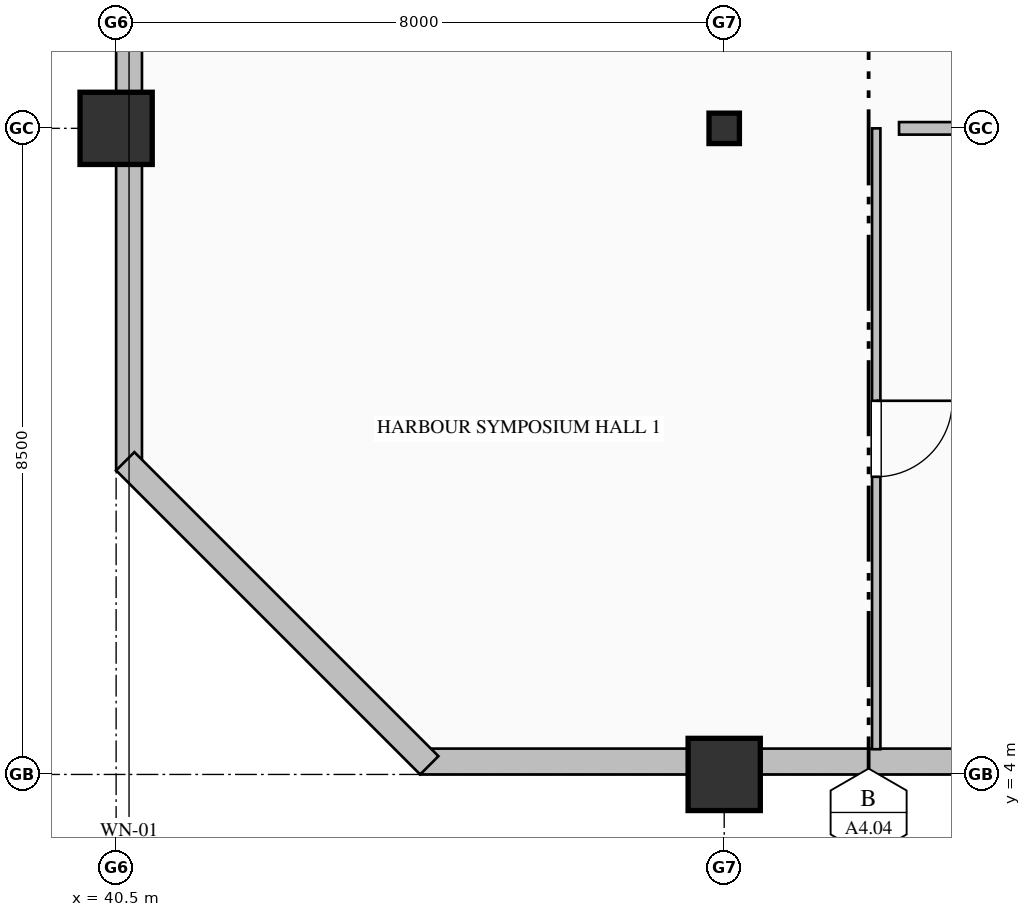
"""IFC4 building model, lengths in metres.
Left out: names, types, materials, properties, quantities, classifications, styles, units other than length and angle.
Written with IfcOpenShell. Run it as: python <this file> out.ifc"""

import sys

from ifc_helpers import new_model, si_unit, direction, frame, frame_2d, origin, origin_2d, place, context, subcontext, project, spatial, rectangle, hollow_rectangle, i_section, extrude, element, fill, save


model = new_model("IFC4")
c1 = context("Model", 3, precision=1e-05, world=origin(), true_north=direction((0.0, 1.0)))
c2 = subcontext(c1, "Body", "Model", "MODEL_VIEW")
j1 = project(units=[si_unit("LENGTHUNIT", "METRE"), si_unit("PLANEANGLEUNIT", "RADIAN")], contexts=[c1])
p1 = place(None, origin())
s1 = spatial("IfcSite", under=j1, at=p1, CompositionType="ELEMENT")
p2 = place(p1, origin())
s2 = spatial("IfcBuilding", under=s1, at=p2, CompositionType="ELEMENT")
p3 = place(p2, frame((0.0, 0.0, 147.0)))
s3 = spatial("IfcBuildingStorey", under=s2, at=p3, CompositionType="ELEMENT", Elevation=147.0)
for number, where, z_axis, x_axis in (
    (1, (40.5, 12.5, 0.0), (0.0, 0.0, 1.0), (1.0, 0.0, 0.0)),
    (2, (48.5, 4.0, 0.0), (0.0, 0.0, 1.0), (1.0, 0.0, 0.0)),
):
    element("IfcColumn", number, at=place(p3, frame(where, z_axis=z_axis, x_axis=x_axis)), inside=s3, PredefinedType="COLUMN", context=c2, shape_type="SweptSolid", body=[
        extrude(hollow_rectangle(XDim=0.95, YDim=0.95, WallThickness=0.036, at=origin_2d()), origin(), (0.0, 0.0, 1.0), 4.0),
    ])
p4 = place(p3, frame((48.5, 12.5, 0.0), z_axis=(0.0, 0.0, 1.0), x_axis=(1.0, 0.0, 0.0)))
e3 = element("IfcColumn", 3, at=p4, inside=s3, PredefinedType="COLUMN", context=c2, shape_type="SweptSolid", body=[
    extrude(i_section(OverallWidth=0.4, OverallDepth=0.4, WebThickness=0.013, FlangeThickness=0.021, FilletRadius=0.022, at=origin_2d()), origin(), (0.0, 0.0, 1.0), 4.0),
])
p5 = place(p3, frame((40.67, 8.0, 0.0), z_axis=(0.0, 0.0, 1.0), x_axis=(0.0, 1.0, 0.0)))
e4 = element("IfcWall", 4, at=p5, inside=s3, PredefinedType="SOLIDWALL", context=c2, shape_type="SweptSolid", body=[
    extrude(rectangle(XDim=20.34, YDim=0.34, at=frame_2d((10.17, 0.0))), origin(), (0.0, 0.0, 1.0), 3.165),
])
p6 = place(p5, frame((13.8, 0.0, 0.7)))
e5 = element("IfcOpeningElement", 5, at=p6, cuts=e4, PredefinedType="OPENING", context=c2, shape_type="SweptSolid", body=[
    extrude(rectangle(XDim=1.2, YDim=1.85, at=frame_2d((0.6, 0.925))), frame((0.0, 0.18, 0.0), z_axis=(0.0, -1.0, 0.0), x_axis=(1.0, 0.0, 0.0)), (0.0, 0.0, 1.0), 0.36),
])
p7 = place(p3, frame((60.0, 4.17, 0.0), z_axis=(0.0, 0.0, 1.0), x_axis=(-1.0, 0.0, 0.0)))
e6 = element("IfcWall", 6, at=p7, inside=s3, PredefinedType="SOLIDWALL", context=c2, shape_type="SweptSolid", body=[
    extrude(rectangle(XDim=15.5, YDim=0.34, at=frame_2d((7.75, 0.0))), origin(), (0.0, 0.0, 1.0), 3.265),
])
p8 = place(p7, frame((6.6, 0.0, 0.7)))
e7 = element("IfcOpeningElement", 7, at=p8, cuts=e6, PredefinedType="OPENING", context=c2, shape_type="SweptSolid", body=[
    extrude(rectangle(XDim=1.2, YDim=1.85, at=frame_2d((0.6, 0.925))), frame((0.0, 0.18, 0.0), z_axis=(0.0, -1.0, 0.0), x_axis=(1.0, 0.0, 0.0)), (0.0, 0.0, 1.0), 0.36),
])
p9 = place(p3, frame((44.62, 4.12, 0.0), z_axis=(0.0, 0.0, 1.0), x_axis=(-0.707106781187, 0.707106781187, 0.0)))
e8 = element("IfcWall", 8, at=p9, inside=s3, PredefinedType="SOLIDWALL", context=c2, shape_type="SweptSolid", body=[
    extrude(rectangle(XDim=5.657, YDim=0.34, at=frame_2d((2.828, 0.0))), origin(), (0.0, 0.0, 1.0), 3.765),
])
p10 = place(p3, frame((53.0, 12.5, 0.0), z_axis=(0.0, 0.0, 1.0), x_axis=(-1.0, 0.0, 0.0)))
e9 = element("IfcWall", 9, at=p10, inside=s3, PredefinedType="PARTITIONING", context=c2, shape_type="SweptSolid", body=[
    extrude(rectangle(XDim=2.2, YDim=0.165, at=frame_2d((1.1, 0.0))), origin(), (0.0, 0.0, 1.0), 3.157),
])
p11 = place(p3, frame((50.5, 12.5, 0.0), z_axis=(0.0, 0.0, 1.0), x_axis=(0.0, -1.0, 0.0)))
e10 = element("IfcWall", 10, at=p11, inside=s3, PredefinedType="MOVABLE", context=c2, shape_type="SweptSolid", body=[
    extrude(rectangle(XDim=8.168, YDim=0.11, at=frame_2d((4.084, 0.0))), origin(), (0.0, 0.0, 1.0), 3.765),
])
p12 = place(p11, frame((3.584, 0.0, 0.0)))
e11 = element("IfcOpeningElement", 11, at=p12, cuts=e10, PredefinedType="OPENING", context=c2, shape_type="SweptSolid", body=[
    extrude(rectangle(XDim=1.0, YDim=2.15, at=frame_2d((0.5, 1.075))), frame((0.0, 0.065, 0.0), z_axis=(0.0, -1.0, 0.0), x_axis=(1.0, 0.0, 0.0)), (0.0, 0.0, 1.0), 0.13),
])
p13 = place(p12, origin())
e12 = element("IfcDoor", 12, at=p13, inside=s3, OperationType="SINGLE_SWING_LEFT", PredefinedType="DOOR", context=c2, shape_type="SweptSolid", body=[
    extrude(rectangle(XDim=1.0, YDim=2.15, at=frame_2d((0.5, 1.075))), frame((0.0, 0.025, 0.0), z_axis=(0.0, -1.0, 0.0), x_axis=(1.0, 0.0, 0.0)), (0.0, 0.0, 1.0), 0.05),
])
fill(e11, e12)
save(model, sys.argv[1])
